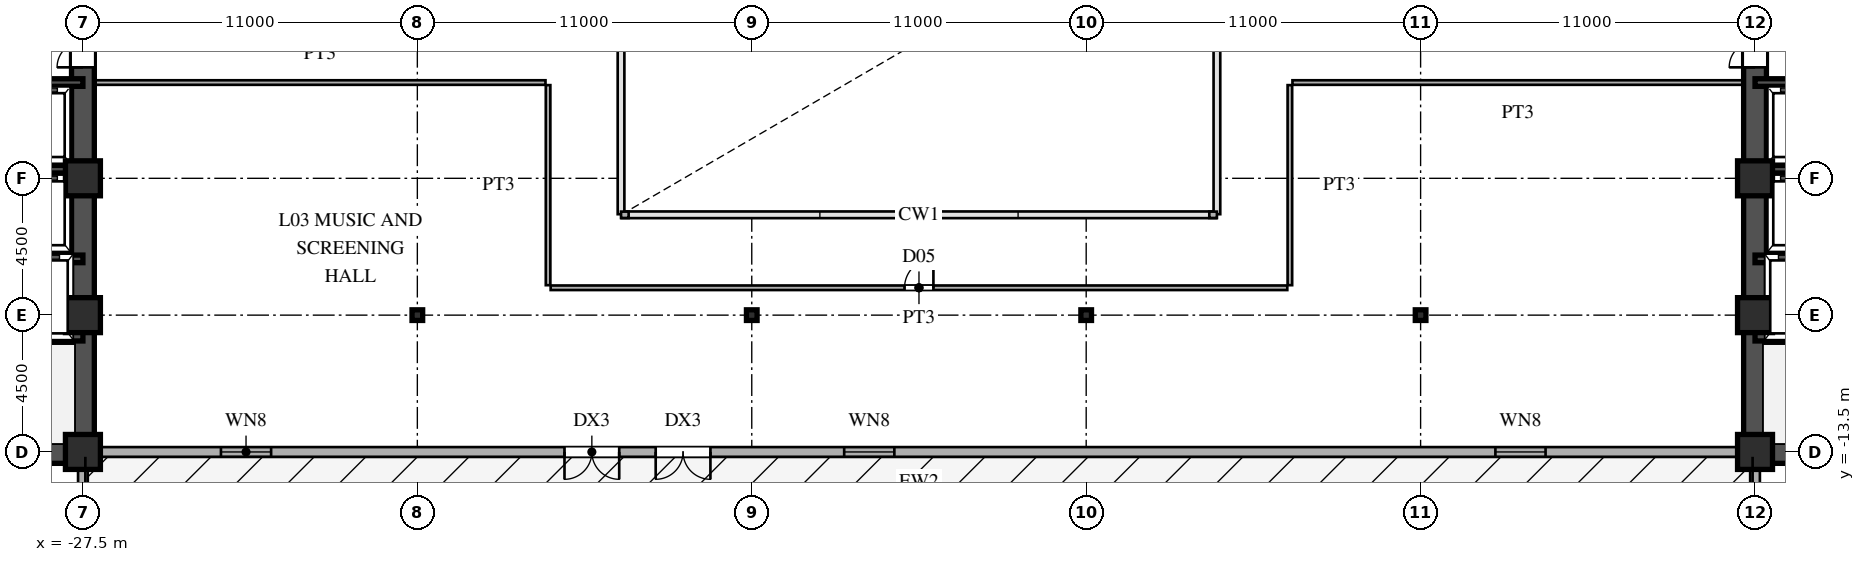
"""IFC4 building model, lengths in metres.
Left out: names, types, materials, properties, quantities, classifications, styles, units other than length and angle.
Written with IfcOpenShell. Run it as: python <this file> out.ifc"""

import sys

from ifc_helpers import new_model, si_unit, direction, frame, frame_2d, origin, origin_2d, place, context, subcontext, project, spatial, rectangle, hollow_rectangle, i_section, extrude, source, transform, mapped, element, fill, save


model = new_model("IFC4")
c1 = context("Model", 3, precision=1e-05, world=origin(), true_north=direction((0.0, 1.0)))
c2 = subcontext(c1, "Body", "Model", "MODEL_VIEW")
j1 = project(units=[si_unit("LENGTHUNIT", "METRE"), si_unit("PLANEANGLEUNIT", "RADIAN")], contexts=[c1])
p1 = place(None, origin())
s1 = spatial("IfcSite", under=j1, at=p1, CompositionType="ELEMENT")
p2 = place(p1, origin())
s2 = spatial("IfcBuilding", under=s1, at=p2, CompositionType="ELEMENT")
p3 = place(p2, frame((0.0, 0.0, 14.4)))
s3 = spatial("IfcBuildingStorey", under=s2, at=p3, CompositionType="ELEMENT", Elevation=14.4)
m1 = source(origin(), c2, "Body", "SweptSolid", [
    extrude(hollow_rectangle(XDim=1.15, YDim=1.15, WallThickness=0.048, at=origin_2d()), origin(), (0.0, 0.0, 1.0), 4.5),
])
for number, where, z_axis, x_axis in (
    (1, (-27.5, -13.5, 0.0), (0.0, 0.0, 1.0), (1.0, 0.0, 0.0)),
    (2, (-27.5, -9.0, 0.0), (0.0, 0.0, 1.0), (1.0, 0.0, 0.0)),
    (3, (-27.5, -4.5, 0.0), (0.0, 0.0, 1.0), (1.0, 0.0, 0.0)),
    (4, (27.5, -13.5, 0.0), (0.0, 0.0, 1.0), (1.0, 0.0, 0.0)),
    (5, (27.5, -9.0, 0.0), (0.0, 0.0, 1.0), (1.0, 0.0, 0.0)),
    (6, (27.5, -4.5, 0.0), (0.0, 0.0, 1.0), (1.0, 0.0, 0.0)),
):
    element("IfcColumn", number, at=place(p3, frame(where, z_axis=z_axis, x_axis=x_axis)), inside=s3, PredefinedType="COLUMN", context=c2, shape_type="MappedRepresentation", body=[
        mapped(m1, transform((0.0, 0.0, 0.0), scale=1.0)),
    ])
m2 = source(origin(), c2, "Body", "SweptSolid", [
    extrude(i_section(OverallWidth=0.35, OverallDepth=0.35, WebThickness=0.012, FlangeThickness=0.019, at=origin_2d()), origin(), (0.0, 0.0, 1.0), 4.5),
])
for number, where, z_axis, x_axis in (
    (7, (-16.5, -9.0, 0.0), (0.0, 0.0, 1.0), (1.0, 0.0, 0.0)),
    (8, (-5.5, -9.0, 0.0), (0.0, 0.0, 1.0), (1.0, 0.0, 0.0)),
    (9, (5.5, -9.0, 0.0), (0.0, 0.0, 1.0), (1.0, 0.0, 0.0)),
    (10, (16.5, -9.0, 0.0), (0.0, 0.0, 1.0), (1.0, 0.0, 0.0)),
):
    element("IfcColumn", number, at=place(p3, frame(where, z_axis=z_axis, x_axis=x_axis)), inside=s3, PredefinedType="COLUMN", context=c2, shape_type="MappedRepresentation", body=[
        mapped(m2, transform((0.0, 0.0, 0.0), scale=1.0)),
    ])
p4 = place(p3, frame((-27.5, -23.95, 0.0), z_axis=(0.0, 0.0, 1.0), x_axis=(0.0, 1.0, 0.0)))
e11 = element("IfcWall", 11, at=p4, inside=s3, PredefinedType="SOLIDWALL", context=c2, shape_type="SweptSolid", body=[
    extrude(rectangle(XDim=10.4, YDim=0.32, at=frame_2d((5.2, 0.0))), origin(), (0.0, 0.0, 1.0), 2.78),
])
p5 = place(p3, frame((-27.46, -13.5, 0.0), z_axis=(0.0, 0.0, 1.0), x_axis=(1.0, 0.0, 0.0)))
e12 = element("IfcWall", 12, at=p5, inside=s3, PredefinedType="SOLIDWALL", context=c2, shape_type="SweptSolid", body=[
    extrude(rectangle(XDim=54.92, YDim=0.32, at=frame_2d((27.46, 0.0))), origin(), (0.0, 0.0, 1.0), 4.28),
])
p6 = place(p5, frame((15.8, 0.0, 0.0)))
e13 = element("IfcOpeningElement", 13, at=p6, cuts=e12, PredefinedType="OPENING", context=c2, shape_type="SweptSolid", body=[
    extrude(rectangle(XDim=1.8, YDim=2.3, at=frame_2d((0.9, 1.15))), frame((0.0, 0.17, 0.0), z_axis=(0.0, -1.0, 0.0), x_axis=(1.0, 0.0, 0.0)), (0.0, 0.0, 1.0), 0.34),
])
p7 = place(p5, frame((18.8, 0.0, 0.0)))
e14 = element("IfcOpeningElement", 14, at=p7, cuts=e12, PredefinedType="OPENING", context=c2, shape_type="SweptSolid", body=[
    extrude(rectangle(XDim=1.8, YDim=2.3, at=frame_2d((0.9, 1.15))), frame((0.0, 0.17, 0.0), z_axis=(0.0, -1.0, 0.0), x_axis=(1.0, 0.0, 0.0)), (0.0, 0.0, 1.0), 0.34),
])
p8 = place(p5, frame((4.5, 0.0, 0.8)))
e15 = element("IfcOpeningElement", 15, at=p8, cuts=e12, PredefinedType="OPENING", context=c2, shape_type="SweptSolid", body=[
    extrude(rectangle(XDim=1.65, YDim=1.85, at=frame_2d((0.825, 0.925))), frame((0.0, 0.17, 0.0), z_axis=(0.0, -1.0, 0.0), x_axis=(1.0, 0.0, 0.0)), (0.0, 0.0, 1.0), 0.34),
])
p9 = place(p5, frame((25.0, 0.0, 0.8)))
e16 = element("IfcOpeningElement", 16, at=p9, cuts=e12, PredefinedType="OPENING", context=c2, shape_type="SweptSolid", body=[
    extrude(rectangle(XDim=1.65, YDim=1.85, at=frame_2d((0.825, 0.925))), frame((0.0, 0.17, 0.0), z_axis=(0.0, -1.0, 0.0), x_axis=(1.0, 0.0, 0.0)), (0.0, 0.0, 1.0), 0.34),
])
p10 = place(p5, frame((46.42, 0.0, 0.8)))
e17 = element("IfcOpeningElement", 17, at=p10, cuts=e12, PredefinedType="OPENING", context=c2, shape_type="SweptSolid", body=[
    extrude(rectangle(XDim=1.65, YDim=1.85, at=frame_2d((0.825, 0.925))), frame((0.0, 0.17, 0.0), z_axis=(0.0, -1.0, 0.0), x_axis=(1.0, 0.0, 0.0)), (0.0, 0.0, 1.0), 0.34),
])
p11 = place(p3, frame((27.5, -23.95, 0.0), z_axis=(0.0, 0.0, 1.0), x_axis=(0.0, 1.0, 0.0)))
e18 = element("IfcWall", 18, at=p11, inside=s3, PredefinedType="SOLIDWALL", context=c2, shape_type="SweptSolid", body=[
    extrude(rectangle(XDim=10.4, YDim=0.32, at=frame_2d((5.2, 0.0))), origin(), (0.0, 0.0, 1.0), 2.78),
])
for number, where, z_axis, x_axis in (
    (19, (-9.8, -5.7, 0.0), (0.0, 0.0, 1.0), (1.0, 0.0, 0.0)),
    (20, (9.8, -5.7, 0.0), (0.0, 0.0, 1.0), (-1.0, 0.0, 0.0)),
):
    element("IfcWall", number, at=place(p3, frame(where, z_axis=z_axis, x_axis=x_axis)), inside=s3, PredefinedType="SOLIDWALL", context=c2, shape_type="SweptSolid", body=[
        extrude(rectangle(XDim=0.25, YDim=0.21, at=frame_2d((0.125, 0.0))), origin(), (0.0, 0.0, 1.0), 4.28),
    ])
p12 = place(p3, frame((-27.5, -13.5, 0.0), z_axis=(0.0, 0.0, 1.0), x_axis=(0.0, 1.0, 0.0)))
e21 = element("IfcWall", 21, at=p12, inside=s3, PredefinedType="SHEAR", context=c2, shape_type="SweptSolid", body=[
    extrude(rectangle(XDim=12.2, YDim=0.75, at=frame_2d((6.1, 0.0))), origin(), (0.0, 0.0, 1.0), 4.28),
])
p13 = place(p3, frame((-27.5, -1.3, 0.0), z_axis=(0.0, 0.0, 1.0), x_axis=(0.0, 1.0, 0.0)))
e22 = element("IfcWall", 22, at=p13, inside=s3, PredefinedType="SHEAR", context=c2, shape_type="SweptSolid", body=[
    extrude(rectangle(XDim=2.6, YDim=0.75, at=frame_2d((1.3, 0.0))), origin(), (0.0, 0.0, 1.0), 4.28),
])
p14 = place(p13, frame((0.45, 0.0, 0.0)))
e23 = element("IfcOpeningElement", 23, at=p14, cuts=e22, PredefinedType="OPENING", context=c2, shape_type="SweptSolid", body=[
    extrude(rectangle(XDim=1.7, YDim=2.35, at=frame_2d((0.85, 1.175))), frame((0.0, 0.385, 0.0), z_axis=(0.0, -1.0, 0.0), x_axis=(1.0, 0.0, 0.0)), (0.0, 0.0, 1.0), 0.77),
])
p15 = place(p3, frame((-36.5, -13.5, 0.0), z_axis=(0.0, 0.0, 1.0), x_axis=(1.0, 0.0, 0.0)))
e24 = element("IfcWall", 24, at=p15, inside=s3, PredefinedType="SHEAR", context=c2, shape_type="SweptSolid", body=[
    extrude(rectangle(XDim=9.0, YDim=0.75, at=frame_2d((4.5, 0.0))), origin(), (0.0, 0.0, 1.0), 4.28),
])
p16 = place(p3, frame((-36.5, -9.7, 0.0), z_axis=(0.0, 0.0, 1.0), x_axis=(1.0, 0.0, 0.0)))
e25 = element("IfcWall", 25, at=p16, inside=s3, PredefinedType="SHEAR", context=c2, shape_type="SweptSolid", body=[
    extrude(rectangle(XDim=9.0, YDim=0.3, at=frame_2d((4.5, 0.0))), origin(), (0.0, 0.0, 1.0), 4.28),
])
p17 = place(p16, frame((0.6, 0.0, 0.0)))
e26 = element("IfcOpeningElement", 26, at=p17, cuts=e25, PredefinedType="OPENING", context=c2, shape_type="SweptSolid", body=[
    extrude(rectangle(XDim=1.1, YDim=2.2, at=frame_2d((0.55, 1.1))), frame((0.0, 0.16, 0.0), z_axis=(0.0, -1.0, 0.0), x_axis=(1.0, 0.0, 0.0)), (0.0, 0.0, 1.0), 0.32),
])
for number, where, z_axis, x_axis in (
    (27, (-30.3, -7.15, 0.0), (0.0, 0.0, 1.0), (1.0, 0.0, 0.0)),
    (28, (-30.3, -4.2, 0.0), (0.0, 0.0, 1.0), (1.0, 0.0, 0.0)),
    (29, (-30.3, -1.35, 0.0), (0.0, 0.0, 1.0), (1.0, 0.0, 0.0)),
):
    element("IfcWall", number, at=place(p3, frame(where, z_axis=z_axis, x_axis=x_axis)), inside=s3, PredefinedType="SHEAR", context=c2, shape_type="SweptSolid", body=[
        extrude(rectangle(XDim=2.8, YDim=0.25, at=frame_2d((1.4, 0.0))), origin(), (0.0, 0.0, 1.0), 4.28),
    ])
p18 = place(p3, frame((27.5, -13.5, 0.0), z_axis=(0.0, 0.0, 1.0), x_axis=(0.0, 1.0, 0.0)))
e30 = element("IfcWall", 30, at=p18, inside=s3, PredefinedType="SHEAR", context=c2, shape_type="SweptSolid", body=[
    extrude(rectangle(XDim=12.2, YDim=0.75, at=frame_2d((6.1, 0.0))), origin(), (0.0, 0.0, 1.0), 4.28),
])
p19 = place(p3, frame((27.5, -1.3, 0.0), z_axis=(0.0, 0.0, 1.0), x_axis=(0.0, 1.0, 0.0)))
e31 = element("IfcWall", 31, at=p19, inside=s3, PredefinedType="SHEAR", context=c2, shape_type="SweptSolid", body=[
    extrude(rectangle(XDim=2.6, YDim=0.75, at=frame_2d((1.3, 0.0))), origin(), (0.0, 0.0, 1.0), 4.28),
])
p20 = place(p19, frame((0.45, 0.0, 0.0)))
e32 = element("IfcOpeningElement", 32, at=p20, cuts=e31, PredefinedType="OPENING", context=c2, shape_type="SweptSolid", body=[
    extrude(rectangle(XDim=1.7, YDim=2.35, at=frame_2d((0.85, 1.175))), frame((0.0, 0.385, 0.0), z_axis=(0.0, -1.0, 0.0), x_axis=(1.0, 0.0, 0.0)), (0.0, 0.0, 1.0), 0.77),
])
p21 = place(p3, frame((27.5, -13.5, 0.0), z_axis=(0.0, 0.0, 1.0), x_axis=(1.0, 0.0, 0.0)))
e33 = element("IfcWall", 33, at=p21, inside=s3, PredefinedType="SHEAR", context=c2, shape_type="SweptSolid", body=[
    extrude(rectangle(XDim=9.0, YDim=0.75, at=frame_2d((4.5, 0.0))), origin(), (0.0, 0.0, 1.0), 4.28),
])
p22 = place(p3, frame((27.5, -9.7, 0.0), z_axis=(0.0, 0.0, 1.0), x_axis=(1.0, 0.0, 0.0)))
e34 = element("IfcWall", 34, at=p22, inside=s3, PredefinedType="SHEAR", context=c2, shape_type="SweptSolid", body=[
    extrude(rectangle(XDim=9.0, YDim=0.3, at=frame_2d((4.5, 0.0))), origin(), (0.0, 0.0, 1.0), 4.28),
])
p23 = place(p22, frame((7.3, 0.0, 0.0)))
e35 = element("IfcOpeningElement", 35, at=p23, cuts=e34, PredefinedType="OPENING", context=c2, shape_type="SweptSolid", body=[
    extrude(rectangle(XDim=1.1, YDim=2.2, at=frame_2d((0.55, 1.1))), frame((0.0, 0.16, 0.0), z_axis=(0.0, -1.0, 0.0), x_axis=(1.0, 0.0, 0.0)), (0.0, 0.0, 1.0), 0.32),
])
for number, where, z_axis, x_axis in (
    (36, (27.5, -7.15, 0.0), (0.0, 0.0, 1.0), (1.0, 0.0, 0.0)),
    (37, (27.5, -4.2, 0.0), (0.0, 0.0, 1.0), (1.0, 0.0, 0.0)),
    (38, (27.5, -1.35, 0.0), (0.0, 0.0, 1.0), (1.0, 0.0, 0.0)),
):
    element("IfcWall", number, at=place(p3, frame(where, z_axis=z_axis, x_axis=x_axis)), inside=s3, PredefinedType="SHEAR", context=c2, shape_type="SweptSolid", body=[
        extrude(rectangle(XDim=2.8, YDim=0.25, at=frame_2d((1.4, 0.0))), origin(), (0.0, 0.0, 1.0), 4.28),
    ])
p24 = place(p3, frame((-12.115, -8.1, 0.0), z_axis=(0.0, 0.0, 1.0), x_axis=(1.0, 0.0, 0.0)))
e39 = element("IfcWall", 39, at=p24, inside=s3, PredefinedType="PARTITIONING", context=c2, shape_type="SweptSolid", body=[
    extrude(rectangle(XDim=24.23, YDim=0.15, at=frame_2d((12.115, 0.0))), origin(), (0.0, 0.0, 1.0), 4.28),
])
p25 = place(p24, frame((11.64, 0.0, 0.0)))
e40 = element("IfcOpeningElement", 40, at=p25, cuts=e39, PredefinedType="OPENING", context=c2, shape_type="SweptSolid", body=[
    extrude(rectangle(XDim=0.95, YDim=2.15, at=frame_2d((0.475, 1.075))), frame((0.0, 0.085, 0.0), z_axis=(0.0, -1.0, 0.0), x_axis=(1.0, 0.0, 0.0)), (0.0, 0.0, 1.0), 0.17),
])
for number, where, z_axis, x_axis in (
    (41, (-27.12, -1.35, 0.0), (0.0, 0.0, 1.0), (1.0, 0.0, 0.0)),
    (42, (12.285, -1.35, 0.0), (0.0, 0.0, 1.0), (1.0, 0.0, 0.0)),
):
    element("IfcWall", number, at=place(p3, frame(where, z_axis=z_axis, x_axis=x_axis)), inside=s3, PredefinedType="PARTITIONING", context=c2, shape_type="SweptSolid", body=[
        extrude(rectangle(XDim=14.835, YDim=0.15, at=frame_2d((7.417, 0.0))), origin(), (0.0, 0.0, 1.0), 4.28),
    ])
for number, where, z_axis, x_axis in (
    (43, (-12.2, -8.015, 0.0), (0.0, 0.0, 1.0), (0.0, 1.0, 0.0)),
    (44, (12.2, -8.015, 0.0), (0.0, 0.0, 1.0), (0.0, 1.0, 0.0)),
):
    element("IfcWall", number, at=place(p3, frame(where, z_axis=z_axis, x_axis=x_axis)), inside=s3, PredefinedType="PARTITIONING", context=c2, shape_type="SweptSolid", body=[
        extrude(rectangle(XDim=6.58, YDim=0.15, at=frame_2d((3.29, 0.0))), origin(), (0.0, 0.0, 1.0), 4.28),
    ])
m3 = source(origin(), c2, "Body", "SweptSolid", [
    extrude(rectangle(XDim=1.8, YDim=2.3, at=frame_2d((0.9, 1.15))), frame((0.0, 0.025, 0.0), z_axis=(0.0, -1.0, 0.0), x_axis=(1.0, 0.0, 0.0)), (0.0, 0.0, 1.0), 0.05),
])
p26 = place(p6, frame((1.8, 0.0, 0.0), z_axis=(0.0, 0.0, 1.0), x_axis=(-1.0, 0.0, 0.0)))
e45 = element("IfcDoor", 45, at=p26, inside=s3, OperationType="DOUBLE_SWING_LEFT", PredefinedType="DOOR", context=c2, shape_type="MappedRepresentation", body=[
    mapped(m3, transform((0.0, 0.0, 0.0), scale=1.0)),
])
fill(e13, e45)
p27 = place(p7, frame((1.8, 0.0, 0.0), z_axis=(0.0, 0.0, 1.0), x_axis=(-1.0, 0.0, 0.0)))
e46 = element("IfcDoor", 46, at=p27, inside=s3, OperationType="DOUBLE_SWING_LEFT", PredefinedType="DOOR", context=c2, shape_type="MappedRepresentation", body=[
    mapped(m3, transform((0.0, 0.0, 0.0), scale=1.0)),
])
fill(e14, e46)
m4 = source(origin(), c2, "Body", "SweptSolid", [
    extrude(rectangle(XDim=1.65, YDim=1.85, at=frame_2d((0.825, 0.925))), frame((0.0, 0.03, 0.0), z_axis=(0.0, -1.0, 0.0), x_axis=(1.0, 0.0, 0.0)), (0.0, 0.0, 1.0), 0.06),
])
p28 = place(p8, origin())
e47 = element("IfcWindow", 47, at=p28, inside=s3, PartitioningType="SINGLE_PANEL", PredefinedType="WINDOW", context=c2, shape_type="MappedRepresentation", body=[
    mapped(m4, transform((0.0, 0.0, 0.0), scale=1.0)),
])
fill(e15, e47)
p29 = place(p9, origin())
e48 = element("IfcWindow", 48, at=p29, inside=s3, PartitioningType="SINGLE_PANEL", PredefinedType="WINDOW", context=c2, shape_type="MappedRepresentation", body=[
    mapped(m4, transform((0.0, 0.0, 0.0), scale=1.0)),
])
fill(e16, e48)
p30 = place(p10, origin())
e49 = element("IfcWindow", 49, at=p30, inside=s3, PartitioningType="SINGLE_PANEL", PredefinedType="WINDOW", context=c2, shape_type="MappedRepresentation", body=[
    mapped(m4, transform((0.0, 0.0, 0.0), scale=1.0)),
])
fill(e17, e49)
m5 = source(origin(), c2, "Body", "SweptSolid", [
    extrude(rectangle(XDim=1.7, YDim=2.35, at=frame_2d((0.85, 1.175))), frame((0.0, 0.025, 0.0), z_axis=(0.0, -1.0, 0.0), x_axis=(1.0, 0.0, 0.0)), (0.0, 0.0, 1.0), 0.05),
])
p31 = place(p14, origin())
e50 = element("IfcDoor", 50, at=p31, inside=s3, OperationType="DOUBLE_SWING_LEFT", PredefinedType="DOOR", context=c2, shape_type="MappedRepresentation", body=[
    mapped(m5, transform((0.0, 0.0, 0.0), scale=1.0)),
])
fill(e23, e50)
p32 = place(p20, origin())
e51 = element("IfcDoor", 51, at=p32, inside=s3, OperationType="DOUBLE_SWING_LEFT", PredefinedType="DOOR", context=c2, shape_type="MappedRepresentation", body=[
    mapped(m5, transform((0.0, 0.0, 0.0), scale=1.0)),
])
fill(e32, e51)
m6 = source(origin(), c2, "Body", "SweptSolid", [
    extrude(rectangle(XDim=0.95, YDim=2.15, at=frame_2d((0.475, 1.075))), frame((0.0, 0.025, 0.0), z_axis=(0.0, -1.0, 0.0), x_axis=(1.0, 0.0, 0.0)), (0.0, 0.0, 1.0), 0.05),
])
p33 = place(p25, origin())
e52 = element("IfcDoor", 52, at=p33, inside=s3, OperationType="SINGLE_SWING_RIGHT", PredefinedType="DOOR", context=c2, shape_type="MappedRepresentation", body=[
    mapped(m6, transform((0.0, 0.0, 0.0), scale=1.0)),
])
fill(e40, e52)
save(model, sys.argv[1])
